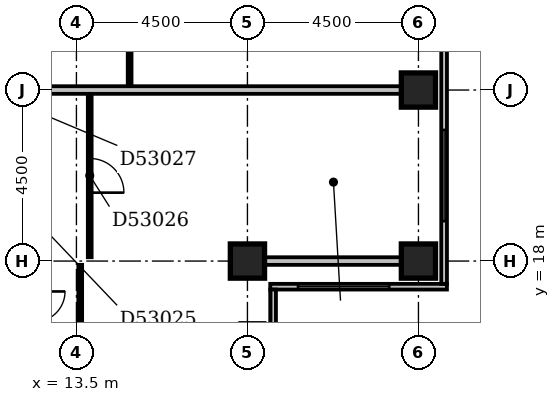
"""IFC4 building model, lengths in metres.
Left out: names, types, materials, properties, quantities, classifications, styles, units other than length and angle.
Written with IfcOpenShell. Run it as: python <this file> out.ifc"""

import sys

from ifc_helpers import new_model, si_unit, direction, frame, frame_2d, origin, origin_2d, place, context, subcontext, project, spatial, rectangle, extrude, element, fill, save


model = new_model("IFC4")
c1 = context("Model", 3, precision=1e-05, world=origin(), true_north=direction((0.0, 1.0)))
c2 = subcontext(c1, "Body", "Model", "MODEL_VIEW")
j1 = project(units=[si_unit("LENGTHUNIT", "METRE"), si_unit("PLANEANGLEUNIT", "RADIAN")], contexts=[c1])
p1 = place(None, origin())
s1 = spatial("IfcSite", under=j1, at=p1, CompositionType="ELEMENT")
p2 = place(p1, origin())
s2 = spatial("IfcBuilding", under=s1, at=p2, CompositionType="ELEMENT")
p3 = place(p2, frame((0.0, 0.0, 207.8)))
s3 = spatial("IfcBuildingStorey", under=s2, at=p3, CompositionType="ELEMENT", Elevation=207.8)
for number, where, z_axis, x_axis in (
    (1, (18.0, 18.0, -0.3), (0.0, 0.0, 1.0), (1.0, 0.0, 0.0)),
    (2, (22.5, 18.0, -0.3), (0.0, 0.0, 1.0), (1.0, 0.0, 0.0)),
    (3, (22.5, 22.5, -0.3), (0.0, 0.0, 1.0), (1.0, 0.0, 0.0)),
):
    element("IfcColumn", number, at=place(p3, frame(where, z_axis=z_axis, x_axis=x_axis)), inside=s3, PredefinedType="COLUMN", context=c2, shape_type="SweptSolid", body=[
        extrude(rectangle(XDim=0.9, YDim=0.9, at=origin_2d()), origin(), (0.0, 0.0, 1.0), 3.55),
    ])
p4 = place(p3, frame((18.675, 8.4, 0.0), z_axis=(0.0, 0.0, 1.0), x_axis=(0.0, 1.0, 0.0)))
e4 = element("IfcWall", 4, at=p4, inside=s3, PredefinedType="STANDARD", context=c2, shape_type="SweptSolid", body=[
    extrude(rectangle(XDim=8.85, YDim=0.15, at=frame_2d((4.425, 0.0))), origin(), (0.0, 0.0, 1.0), 2.7),
])
p5 = place(p4, frame((1.65, 0.0, 0.6)))
e5 = element("IfcOpeningElement", 5, at=p5, cuts=e4, PredefinedType="OPENING", context=c2, shape_type="SweptSolid", body=[
    extrude(rectangle(XDim=2.4, YDim=1.8, at=frame_2d((1.2, 0.9))), frame((0.0, 0.087, 0.0), z_axis=(0.0, -1.0, 0.0), x_axis=(1.0, 0.0, 0.0)), (0.0, 0.0, 1.0), 0.174),
])
p6 = place(p4, frame((5.781, 0.0, 0.6)))
e6 = element("IfcOpeningElement", 6, at=p6, cuts=e4, PredefinedType="OPENING", context=c2, shape_type="SweptSolid", body=[
    extrude(rectangle(XDim=1.8, YDim=1.8, at=frame_2d((0.9, 0.9))), frame((0.0, 0.087, 0.0), z_axis=(0.0, -1.0, 0.0), x_axis=(1.0, 0.0, 0.0)), (0.0, 0.0, 1.0), 0.174),
])
p7 = place(p3, frame((18.6, 17.325, 0.0), z_axis=(0.0, 0.0, 1.0), x_axis=(1.0, 0.0, 0.0)))
e7 = element("IfcWall", 7, at=p7, inside=s3, PredefinedType="STANDARD", context=c2, shape_type="SweptSolid", body=[
    extrude(rectangle(XDim=4.65, YDim=0.15, at=frame_2d((2.325, 0.0))), origin(), (0.0, 0.0, 1.0), 2.7),
])
p8 = place(p7, frame((0.731, 0.0, 0.6)))
e8 = element("IfcOpeningElement", 8, at=p8, cuts=e7, PredefinedType="OPENING", context=c2, shape_type="SweptSolid", body=[
    extrude(rectangle(XDim=2.4, YDim=1.8, at=frame_2d((1.2, 0.9))), frame((0.0, 0.087, 0.0), z_axis=(0.0, -1.0, 0.0), x_axis=(1.0, 0.0, 0.0)), (0.0, 0.0, 1.0), 0.174),
])
p9 = place(p3, frame((23.175, 17.4, 0.0), z_axis=(0.0, 0.0, 1.0), x_axis=(0.0, 1.0, 0.0)))
e9 = element("IfcWall", 9, at=p9, inside=s3, PredefinedType="STANDARD", context=c2, shape_type="SweptSolid", body=[
    extrude(rectangle(XDim=17.85, YDim=0.15, at=frame_2d((8.925, 0.0))), origin(), (0.0, 0.0, 1.0), 2.7),
])
p10 = place(p9, frame((1.65, 0.0, 0.6)))
e10 = element("IfcOpeningElement", 10, at=p10, cuts=e9, PredefinedType="OPENING", context=c2, shape_type="SweptSolid", body=[
    extrude(rectangle(XDim=2.4, YDim=1.8, at=frame_2d((1.2, 0.9))), frame((0.0, 0.087, 0.0), z_axis=(0.0, -1.0, 0.0), x_axis=(1.0, 0.0, 0.0)), (0.0, 0.0, 1.0), 0.174),
])
p11 = place(p9, frame((6.15, 0.0, 0.6)))
e11 = element("IfcOpeningElement", 11, at=p11, cuts=e9, PredefinedType="OPENING", context=c2, shape_type="SweptSolid", body=[
    extrude(rectangle(XDim=2.4, YDim=1.8, at=frame_2d((1.2, 0.9))), frame((0.0, 0.087, 0.0), z_axis=(0.0, -1.0, 0.0), x_axis=(1.0, 0.0, 0.0)), (0.0, 0.0, 1.0), 0.174),
])
p12 = place(p9, frame((10.65, 0.0, 0.6)))
e12 = element("IfcOpeningElement", 12, at=p12, cuts=e9, PredefinedType="OPENING", context=c2, shape_type="SweptSolid", body=[
    extrude(rectangle(XDim=2.4, YDim=1.8, at=frame_2d((1.2, 0.9))), frame((0.0, 0.087, 0.0), z_axis=(0.0, -1.0, 0.0), x_axis=(1.0, 0.0, 0.0)), (0.0, 0.0, 1.0), 0.174),
])
p13 = place(p9, frame((14.787, 0.0, 0.6)))
e13 = element("IfcOpeningElement", 13, at=p13, cuts=e9, PredefinedType="OPENING", context=c2, shape_type="SweptSolid", body=[
    extrude(rectangle(XDim=0.9, YDim=1.8, at=frame_2d((0.45, 0.9))), frame((0.0, 0.087, 0.0), z_axis=(0.0, -1.0, 0.0), x_axis=(1.0, 0.0, 0.0)), (0.0, 0.0, 1.0), 0.174),
])
p14 = place(p3, frame((13.6, 9.45, 0.0), z_axis=(0.0, 0.0, 1.0), x_axis=(0.0, 1.0, 0.0)))
e14 = element("IfcWall", 14, at=p14, inside=s3, PredefinedType="PARTITIONING", context=c2, shape_type="SweptSolid", body=[
    extrude(rectangle(XDim=8.45, YDim=0.1, at=frame_2d((4.225, 0.0))), origin(), (0.0, 0.0, 1.0), 3.25),
])
p15 = place(p14, frame((1.35, 0.0, 0.0)))
e15 = element("IfcOpeningElement", 15, at=p15, cuts=e14, PredefinedType="OPENING", context=c2, shape_type="SweptSolid", body=[
    extrude(rectangle(XDim=0.9, YDim=2.1, at=frame_2d((0.45, 1.05))), frame((0.0, 0.062, 0.0), z_axis=(0.0, -1.0, 0.0), x_axis=(1.0, 0.0, 0.0)), (0.0, 0.0, 1.0), 0.124),
])
p16 = place(p14, frame((5.85, 0.0, 0.0)))
e16 = element("IfcOpeningElement", 16, at=p16, cuts=e14, PredefinedType="OPENING", context=c2, shape_type="SweptSolid", body=[
    extrude(rectangle(XDim=0.9, YDim=2.1, at=frame_2d((0.45, 1.05))), frame((0.0, 0.062, 0.0), z_axis=(0.0, -1.0, 0.0), x_axis=(1.0, 0.0, 0.0)), (0.0, 0.0, 1.0), 0.124),
])
p17 = place(p3, frame((18.45, 18.0, 0.0), z_axis=(0.0, 0.0, 1.0), x_axis=(1.0, 0.0, 0.0)))
e17 = element("IfcWall", 17, at=p17, inside=s3, PredefinedType="PARTITIONING", context=c2, shape_type="SweptSolid", body=[
    extrude(rectangle(XDim=3.6, YDim=0.2, at=frame_2d((1.8, 0.0))), origin(), (0.0, 0.0, 1.0), 2.7),
])
p18 = place(p3, frame((13.85, 18.1, 0.0), z_axis=(0.0, 0.0, 1.0), x_axis=(0.0, 1.0, 0.0)))
e18 = element("IfcWall", 18, at=p18, inside=s3, PredefinedType="PARTITIONING", context=c2, shape_type="SweptSolid", body=[
    extrude(rectangle(XDim=4.3, YDim=0.1, at=frame_2d((2.15, 0.0))), origin(), (0.0, 0.0, 1.0), 3.25),
])
p19 = place(p18, frame((1.7, 0.0, 0.0)))
e19 = element("IfcOpeningElement", 19, at=p19, cuts=e18, PredefinedType="OPENING", context=c2, shape_type="SweptSolid", body=[
    extrude(rectangle(XDim=0.9, YDim=2.1, at=frame_2d((0.45, 1.05))), frame((0.0, 0.062, 0.0), z_axis=(0.0, -1.0, 0.0), x_axis=(1.0, 0.0, 0.0)), (0.0, 0.0, 1.0), 0.124),
])
p20 = place(p3, frame((9.1, 22.5, 0.0), z_axis=(0.0, 0.0, 1.0), x_axis=(1.0, 0.0, 0.0)))
e20 = element("IfcWall", 20, at=p20, inside=s3, PredefinedType="PARTITIONING", context=c2, shape_type="SweptSolid", body=[
    extrude(rectangle(XDim=12.95, YDim=0.2, at=frame_2d((6.475, 0.0))), origin(), (0.0, 0.0, 1.0), 3.25),
])
p21 = place(p3, frame((14.9, 22.6, 0.0), z_axis=(0.0, 0.0, 1.0), x_axis=(0.0, 1.0, 0.0)))
e21 = element("IfcWall", 21, at=p21, inside=s3, PredefinedType="PARTITIONING", context=c2, shape_type="SweptSolid", body=[
    extrude(rectangle(XDim=13.3, YDim=0.1, at=frame_2d((6.65, 0.0))), origin(), (0.0, 0.0, 1.0), 3.25),
])
p22 = place(p21, frame((1.7, 0.0, 0.0)))
e22 = element("IfcOpeningElement", 22, at=p22, cuts=e21, PredefinedType="OPENING", context=c2, shape_type="SweptSolid", body=[
    extrude(rectangle(XDim=0.9, YDim=2.1, at=frame_2d((0.45, 1.05))), frame((0.0, 0.062, 0.0), z_axis=(0.0, -1.0, 0.0), x_axis=(1.0, 0.0, 0.0)), (0.0, 0.0, 1.0), 0.124),
])
p23 = place(p21, frame((6.2, 0.0, 0.0)))
e23 = element("IfcOpeningElement", 23, at=p23, cuts=e21, PredefinedType="OPENING", context=c2, shape_type="SweptSolid", body=[
    extrude(rectangle(XDim=0.9, YDim=2.1, at=frame_2d((0.45, 1.05))), frame((0.0, 0.062, 0.0), z_axis=(0.0, -1.0, 0.0), x_axis=(1.0, 0.0, 0.0)), (0.0, 0.0, 1.0), 0.124),
])
p24 = place(p21, frame((10.7, 0.0, 0.0)))
e24 = element("IfcOpeningElement", 24, at=p24, cuts=e21, PredefinedType="OPENING", context=c2, shape_type="SweptSolid", body=[
    extrude(rectangle(XDim=0.9, YDim=2.1, at=frame_2d((0.45, 1.05))), frame((0.0, 0.062, 0.0), z_axis=(0.0, -1.0, 0.0), x_axis=(1.0, 0.0, 0.0)), (0.0, 0.0, 1.0), 0.124),
])
p25 = place(p8, origin())
e25 = element("IfcWindow", 25, at=p25, inside=s3, PartitioningType="SINGLE_PANEL", PredefinedType="WINDOW", context=c2, shape_type="SweptSolid", body=[
    extrude(rectangle(XDim=2.4, YDim=1.8, at=frame_2d((1.2, 0.9))), frame((0.0, 0.03, 0.0), z_axis=(0.0, -1.0, 0.0), x_axis=(1.0, 0.0, 0.0)), (0.0, 0.0, 1.0), 0.06),
])
fill(e8, e25)
p26 = place(p10, origin())
e26 = element("IfcWindow", 26, at=p26, inside=s3, PartitioningType="SINGLE_PANEL", PredefinedType="WINDOW", context=c2, shape_type="SweptSolid", body=[
    extrude(rectangle(XDim=2.4, YDim=1.8, at=frame_2d((1.2, 0.9))), frame((0.0, 0.03, 0.0), z_axis=(0.0, -1.0, 0.0), x_axis=(1.0, 0.0, 0.0)), (0.0, 0.0, 1.0), 0.06),
])
fill(e10, e26)
p27 = place(p19, frame((0.9, 0.0, 0.0), z_axis=(0.0, 0.0, 1.0), x_axis=(-1.0, 0.0, 0.0)))
e27 = element("IfcDoor", 27, at=p27, inside=s3, OperationType="SINGLE_SWING_RIGHT", PredefinedType="DOOR", context=c2, shape_type="SweptSolid", body=[
    extrude(rectangle(XDim=0.9, YDim=2.1, at=frame_2d((0.45, 1.05))), frame((0.0, 0.025, 0.0), z_axis=(0.0, -1.0, 0.0), x_axis=(1.0, 0.0, 0.0)), (0.0, 0.0, 1.0), 0.05),
])
fill(e19, e27)
save(model, sys.argv[1])
